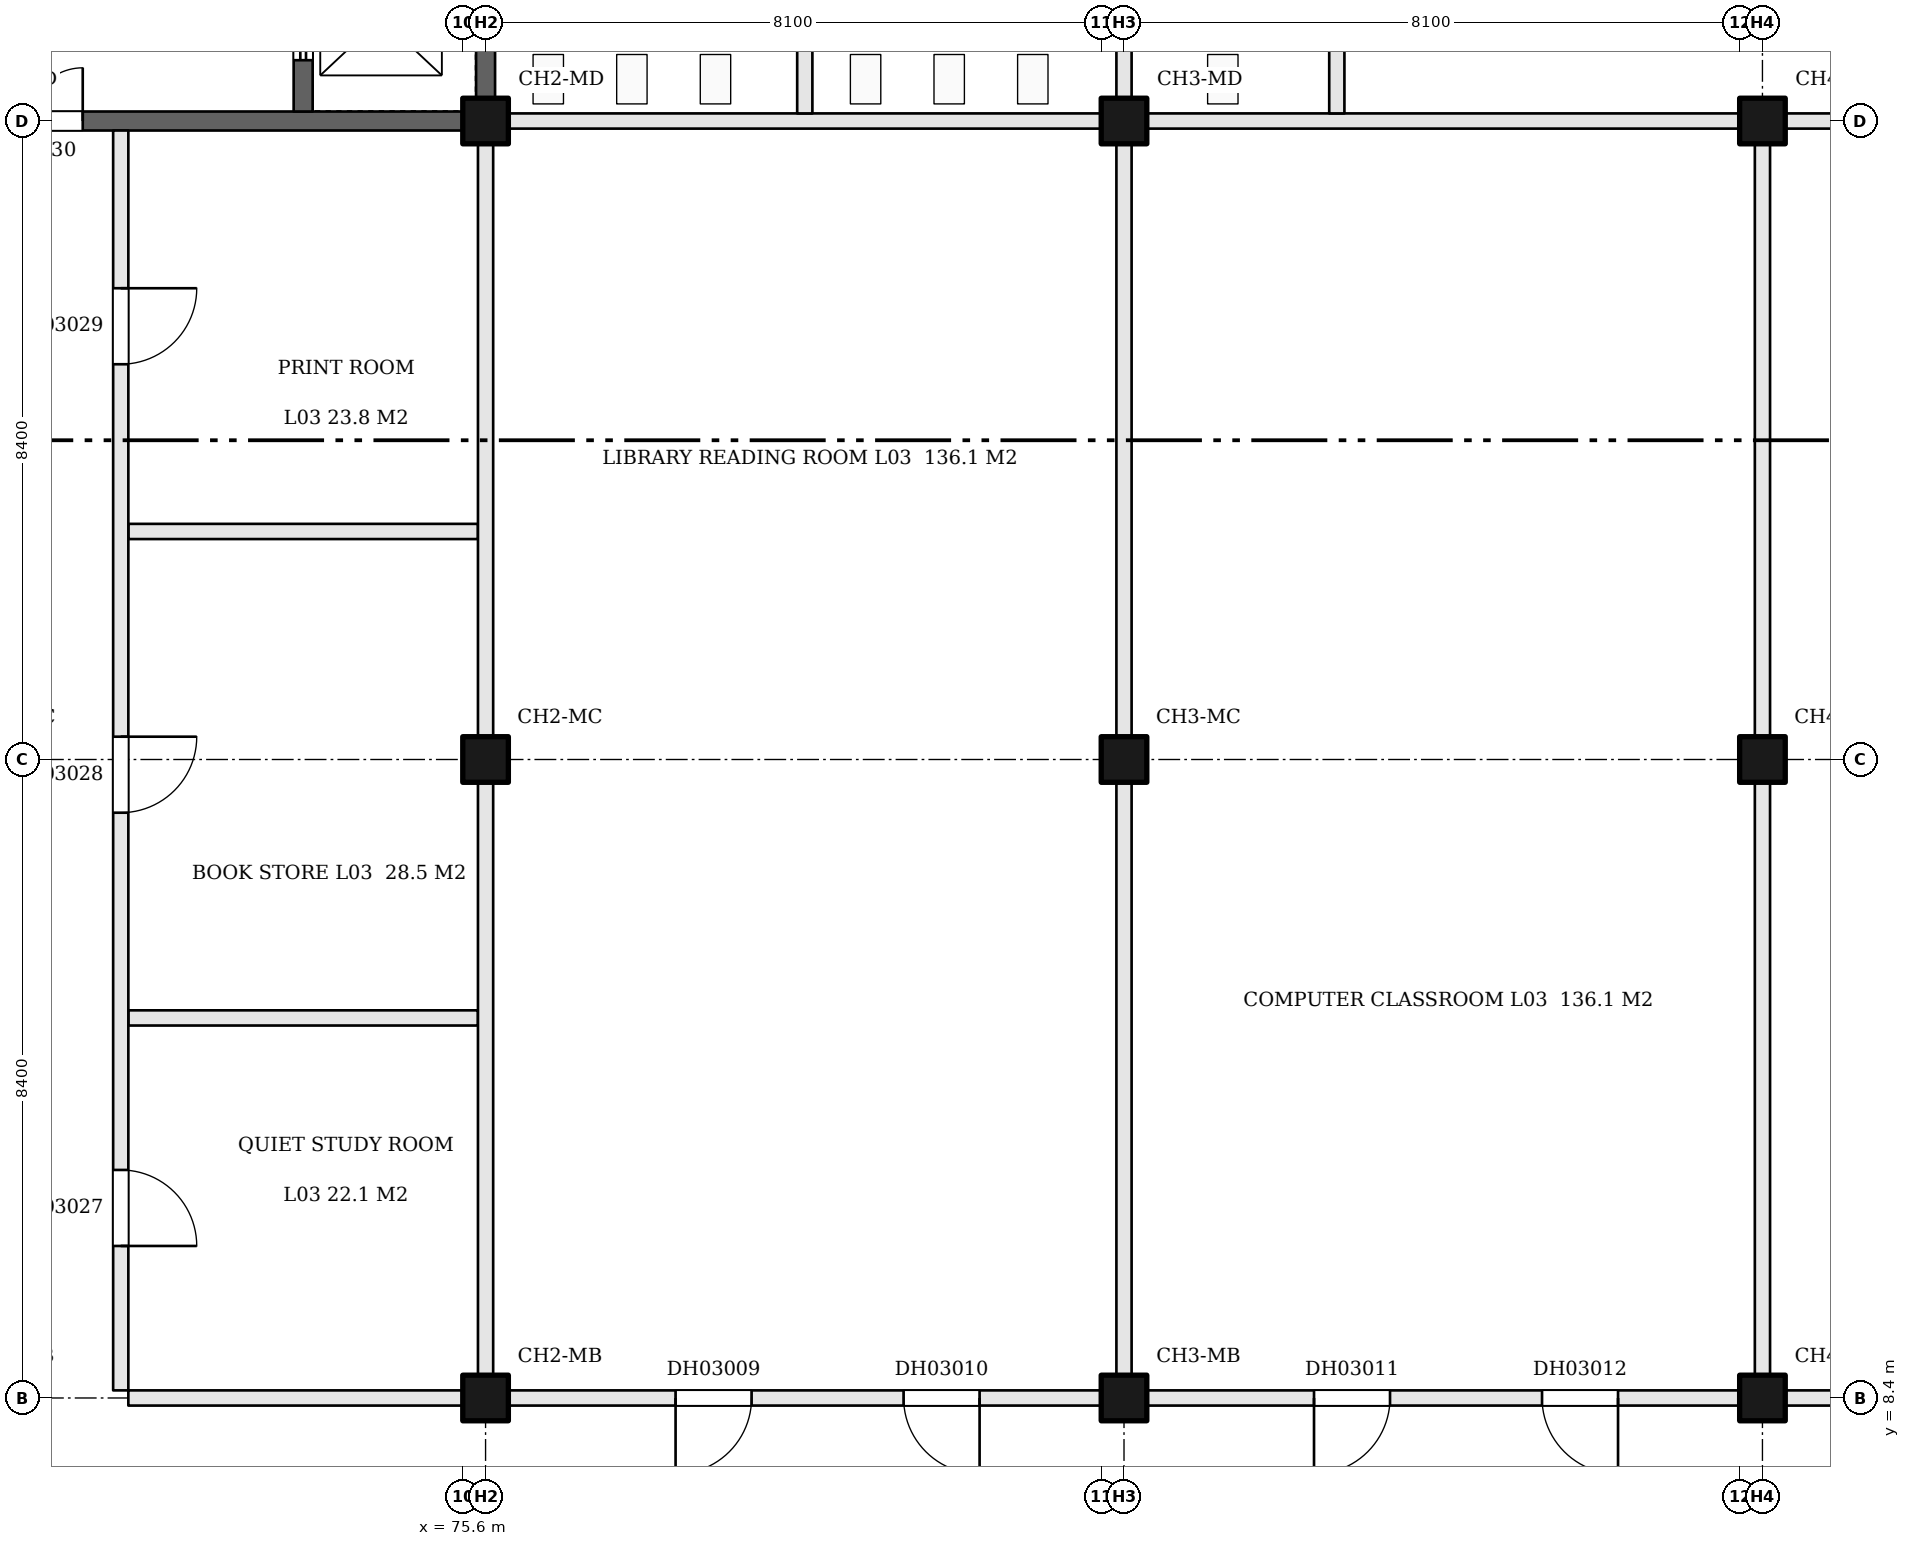
"""IFC4 building model, lengths in metres.
Left out: names, types, materials, properties, quantities, classifications, styles, units other than length and angle.
Written with IfcOpenShell. Run it as: python <this file> out.ifc"""

import sys

from ifc_helpers import new_model, si_unit, direction, frame, frame_2d, origin, origin_2d, place, context, subcontext, project, spatial, rectangle, extrude, element, fill, save


model = new_model("IFC4")
c1 = context("Model", 3, precision=1e-05, world=origin(), true_north=direction((0.0, 1.0)))
c2 = subcontext(c1, "Body", "Model", "MODEL_VIEW")
j1 = project(units=[si_unit("LENGTHUNIT", "METRE"), si_unit("PLANEANGLEUNIT", "RADIAN")], contexts=[c1])
p1 = place(None, origin())
s1 = spatial("IfcSite", under=j1, at=p1, CompositionType="ELEMENT")
p2 = place(p1, origin())
s2 = spatial("IfcBuilding", under=s1, at=p2, CompositionType="ELEMENT")
p3 = place(p2, frame((0.0, 0.0, 19.8)))
s3 = spatial("IfcBuildingStorey", under=s2, at=p3, CompositionType="ELEMENT", Elevation=19.8)
for number, where, z_axis, x_axis in (
    (1, (75.9, 8.4, 0.0), (0.0, 0.0, 1.0), (1.0, 0.0, 0.0)),
    (2, (75.9, 16.8, 0.0), (0.0, 0.0, 1.0), (1.0, 0.0, 0.0)),
    (3, (75.9, 25.2, 0.0), (0.0, 0.0, 1.0), (1.0, 0.0, 0.0)),
    (4, (84.3, 8.4, 0.0), (0.0, 0.0, 1.0), (1.0, 0.0, 0.0)),
    (5, (84.3, 16.8, 0.0), (0.0, 0.0, 1.0), (1.0, 0.0, 0.0)),
    (6, (84.3, 25.2, 0.0), (0.0, 0.0, 1.0), (1.0, 0.0, 0.0)),
    (7, (92.7, 8.4, 0.0), (0.0, 0.0, 1.0), (1.0, 0.0, 0.0)),
    (8, (92.7, 16.8, 0.0), (0.0, 0.0, 1.0), (1.0, 0.0, 0.0)),
    (9, (92.7, 25.2, 0.0), (0.0, 0.0, 1.0), (1.0, 0.0, 0.0)),
):
    element("IfcColumn", number, at=place(p3, frame(where, z_axis=z_axis, x_axis=x_axis)), inside=s3, PredefinedType="COLUMN", context=c2, shape_type="SweptSolid", body=[
        extrude(rectangle(XDim=0.6, YDim=0.6, at=origin_2d()), origin(), (0.0, 0.0, 1.0), 5.0),
    ])
p4 = place(p3, frame((71.2, 8.4, 0.0), z_axis=(0.0, 0.0, 1.0), x_axis=(1.0, 0.0, 0.0)))
e10 = element("IfcWall", 10, at=p4, inside=s3, PredefinedType="PARTITIONING", context=c2, shape_type="SweptSolid", body=[
    extrude(rectangle(XDim=4.4, YDim=0.2, at=frame_2d((2.2, 0.0))), origin(), (0.0, 0.0, 1.0), 5.0),
])
p5 = place(p3, frame((76.2, 8.4, 0.0), z_axis=(0.0, 0.0, 1.0), x_axis=(1.0, 0.0, 0.0)))
e11 = element("IfcWall", 11, at=p5, inside=s3, PredefinedType="PARTITIONING", context=c2, shape_type="SweptSolid", body=[
    extrude(rectangle(XDim=7.8, YDim=0.2, at=frame_2d((3.9, 0.0))), origin(), (0.0, 0.0, 1.0), 5.0),
])
p6 = place(p5, frame((2.2, 0.0, 0.0)))
e12 = element("IfcOpeningElement", 12, at=p6, cuts=e11, PredefinedType="OPENING", context=c2, shape_type="SweptSolid", body=[
    extrude(rectangle(XDim=1.0, YDim=2.1, at=frame_2d((0.5, 1.05))), frame((0.0, 0.11, 0.0), z_axis=(0.0, -1.0, 0.0), x_axis=(1.0, 0.0, 0.0)), (0.0, 0.0, 1.0), 0.22),
])
p7 = place(p5, frame((5.2, 0.0, 0.0)))
e13 = element("IfcOpeningElement", 13, at=p7, cuts=e11, PredefinedType="OPENING", context=c2, shape_type="SweptSolid", body=[
    extrude(rectangle(XDim=1.0, YDim=2.1, at=frame_2d((0.5, 1.05))), frame((0.0, 0.11, 0.0), z_axis=(0.0, -1.0, 0.0), x_axis=(1.0, 0.0, 0.0)), (0.0, 0.0, 1.0), 0.22),
])
p8 = place(p3, frame((84.6, 8.4, 0.0), z_axis=(0.0, 0.0, 1.0), x_axis=(1.0, 0.0, 0.0)))
e14 = element("IfcWall", 14, at=p8, inside=s3, PredefinedType="PARTITIONING", context=c2, shape_type="SweptSolid", body=[
    extrude(rectangle(XDim=7.8, YDim=0.2, at=frame_2d((3.9, 0.0))), origin(), (0.0, 0.0, 1.0), 5.0),
])
p9 = place(p8, frame((2.2, 0.0, 0.0)))
e15 = element("IfcOpeningElement", 15, at=p9, cuts=e14, PredefinedType="OPENING", context=c2, shape_type="SweptSolid", body=[
    extrude(rectangle(XDim=1.0, YDim=2.1, at=frame_2d((0.5, 1.05))), frame((0.0, 0.11, 0.0), z_axis=(0.0, -1.0, 0.0), x_axis=(1.0, 0.0, 0.0)), (0.0, 0.0, 1.0), 0.22),
])
p10 = place(p8, frame((5.2, 0.0, 0.0)))
e16 = element("IfcOpeningElement", 16, at=p10, cuts=e14, PredefinedType="OPENING", context=c2, shape_type="SweptSolid", body=[
    extrude(rectangle(XDim=1.0, YDim=2.1, at=frame_2d((0.5, 1.05))), frame((0.0, 0.11, 0.0), z_axis=(0.0, -1.0, 0.0), x_axis=(1.0, 0.0, 0.0)), (0.0, 0.0, 1.0), 0.22),
])
p11 = place(p3, frame((93.0, 8.4, 0.0), z_axis=(0.0, 0.0, 1.0), x_axis=(1.0, 0.0, 0.0)))
e17 = element("IfcWall", 17, at=p11, inside=s3, PredefinedType="PARTITIONING", context=c2, shape_type="SweptSolid", body=[
    extrude(rectangle(XDim=7.8, YDim=0.2, at=frame_2d((3.9, 0.0))), origin(), (0.0, 0.0, 1.0), 5.0),
])
p12 = place(p11, frame((2.2, 0.0, 0.0)))
e18 = element("IfcOpeningElement", 18, at=p12, cuts=e17, PredefinedType="OPENING", context=c2, shape_type="SweptSolid", body=[
    extrude(rectangle(XDim=1.0, YDim=2.1, at=frame_2d((0.5, 1.05))), frame((0.0, 0.11, 0.0), z_axis=(0.0, -1.0, 0.0), x_axis=(1.0, 0.0, 0.0)), (0.0, 0.0, 1.0), 0.22),
])
p13 = place(p11, frame((5.2, 0.0, 0.0)))
e19 = element("IfcOpeningElement", 19, at=p13, cuts=e17, PredefinedType="OPENING", context=c2, shape_type="SweptSolid", body=[
    extrude(rectangle(XDim=1.0, YDim=2.1, at=frame_2d((0.5, 1.05))), frame((0.0, 0.11, 0.0), z_axis=(0.0, -1.0, 0.0), x_axis=(1.0, 0.0, 0.0)), (0.0, 0.0, 1.0), 0.22),
])
for number, where, z_axis, x_axis in (
    (20, (71.2, 13.4, 0.0), (0.0, 0.0, 1.0), (1.0, 0.0, 0.0)),
    (21, (71.2, 19.8, 0.0), (0.0, 0.0, 1.0), (1.0, 0.0, 0.0)),
):
    element("IfcWall", number, at=place(p3, frame(where, z_axis=z_axis, x_axis=x_axis)), inside=s3, PredefinedType="PARTITIONING", context=c2, shape_type="SweptSolid", body=[
        extrude(rectangle(XDim=4.6, YDim=0.2, at=frame_2d((2.3, 0.0))), origin(), (0.0, 0.0, 1.0), 5.0),
    ])
p14 = place(p3, frame((69.0, 25.2, 0.0), z_axis=(0.0, 0.0, 1.0), x_axis=(1.0, 0.0, 0.0)))
e22 = element("IfcWall", 22, at=p14, inside=s3, PredefinedType="SHEAR", context=c2, shape_type="SweptSolid", body=[
    extrude(rectangle(XDim=6.6, YDim=0.25, at=frame_2d((3.3, 0.0))), origin(), (0.0, 0.0, 1.0), 5.0),
])
p15 = place(p14, frame((0.2, 0.0, 0.0)))
e23 = element("IfcOpeningElement", 23, at=p15, cuts=e22, PredefinedType="OPENING", context=c2, shape_type="SweptSolid", body=[
    extrude(rectangle(XDim=1.4, YDim=2.1, at=frame_2d((0.7, 1.05))), frame((0.0, 0.135, 0.0), z_axis=(0.0, -1.0, 0.0), x_axis=(1.0, 0.0, 0.0)), (0.0, 0.0, 1.0), 0.27),
])
p16 = place(p3, frame((76.2, 25.2, 0.0), z_axis=(0.0, 0.0, 1.0), x_axis=(1.0, 0.0, 0.0)))
e24 = element("IfcWall", 24, at=p16, inside=s3, PredefinedType="PARTITIONING", context=c2, shape_type="SweptSolid", body=[
    extrude(rectangle(XDim=7.8, YDim=0.2, at=frame_2d((3.9, 0.0))), origin(), (0.0, 0.0, 1.0), 5.0),
])
p17 = place(p3, frame((84.6, 25.2, 0.0), z_axis=(0.0, 0.0, 1.0), x_axis=(1.0, 0.0, 0.0)))
e25 = element("IfcWall", 25, at=p17, inside=s3, PredefinedType="PARTITIONING", context=c2, shape_type="SweptSolid", body=[
    extrude(rectangle(XDim=7.8, YDim=0.2, at=frame_2d((3.9, 0.0))), origin(), (0.0, 0.0, 1.0), 5.0),
])
p18 = place(p3, frame((93.0, 25.2, 0.0), z_axis=(0.0, 0.0, 1.0), x_axis=(1.0, 0.0, 0.0)))
e26 = element("IfcWall", 26, at=p18, inside=s3, PredefinedType="PARTITIONING", context=c2, shape_type="SweptSolid", body=[
    extrude(rectangle(XDim=7.8, YDim=0.2, at=frame_2d((3.9, 0.0))), origin(), (0.0, 0.0, 1.0), 5.0),
])
p19 = place(p3, frame((71.1, 8.5, 0.0), z_axis=(0.0, 0.0, 1.0), x_axis=(0.0, 1.0, 0.0)))
e27 = element("IfcWall", 27, at=p19, inside=s3, PredefinedType="PARTITIONING", context=c2, shape_type="SweptSolid", body=[
    extrude(rectangle(XDim=16.575, YDim=0.2, at=frame_2d((8.288, 0.0))), origin(), (0.0, 0.0, 1.0), 5.0),
])
p20 = place(p19, frame((1.9, 0.0, 0.0)))
e28 = element("IfcOpeningElement", 28, at=p20, cuts=e27, PredefinedType="OPENING", context=c2, shape_type="SweptSolid", body=[
    extrude(rectangle(XDim=1.0, YDim=2.1, at=frame_2d((0.5, 1.05))), frame((0.0, 0.11, 0.0), z_axis=(0.0, -1.0, 0.0), x_axis=(1.0, 0.0, 0.0)), (0.0, 0.0, 1.0), 0.22),
])
p21 = place(p19, frame((7.6, 0.0, 0.0)))
e29 = element("IfcOpeningElement", 29, at=p21, cuts=e27, PredefinedType="OPENING", context=c2, shape_type="SweptSolid", body=[
    extrude(rectangle(XDim=1.0, YDim=2.1, at=frame_2d((0.5, 1.05))), frame((0.0, 0.11, 0.0), z_axis=(0.0, -1.0, 0.0), x_axis=(1.0, 0.0, 0.0)), (0.0, 0.0, 1.0), 0.22),
])
p22 = place(p19, frame((13.5, 0.0, 0.0)))
e30 = element("IfcOpeningElement", 30, at=p22, cuts=e27, PredefinedType="OPENING", context=c2, shape_type="SweptSolid", body=[
    extrude(rectangle(XDim=1.0, YDim=2.1, at=frame_2d((0.5, 1.05))), frame((0.0, 0.11, 0.0), z_axis=(0.0, -1.0, 0.0), x_axis=(1.0, 0.0, 0.0)), (0.0, 0.0, 1.0), 0.22),
])
p23 = place(p3, frame((73.5, 25.325, 0.0), z_axis=(0.0, 0.0, 1.0), x_axis=(0.0, 1.0, 0.0)))
e31 = element("IfcWall", 31, at=p23, inside=s3, PredefinedType="SHEAR", context=c2, shape_type="SweptSolid", body=[
    extrude(rectangle(XDim=5.15, YDim=0.25, at=frame_2d((2.575, 0.0))), origin(), (0.0, 0.0, 1.0), 5.0),
])
p24 = place(p23, frame((0.675, 0.0, 0.0)))
e32 = element("IfcOpeningElement", 32, at=p24, cuts=e31, PredefinedType="OPENING", context=c2, shape_type="SweptSolid", body=[
    extrude(rectangle(XDim=1.1, YDim=2.1, at=frame_2d((0.55, 1.05))), frame((0.0, 0.135, 0.0), z_axis=(0.0, -1.0, 0.0), x_axis=(1.0, 0.0, 0.0)), (0.0, 0.0, 1.0), 0.27),
])
p25 = place(p23, frame((3.475, 0.0, 0.0)))
e33 = element("IfcOpeningElement", 33, at=p25, cuts=e31, PredefinedType="OPENING", context=c2, shape_type="SweptSolid", body=[
    extrude(rectangle(XDim=0.9, YDim=2.1, at=frame_2d((0.45, 1.05))), frame((0.0, 0.135, 0.0), z_axis=(0.0, -1.0, 0.0), x_axis=(1.0, 0.0, 0.0)), (0.0, 0.0, 1.0), 0.27),
])
p26 = place(p3, frame((75.9, 8.7, 0.0), z_axis=(0.0, 0.0, 1.0), x_axis=(0.0, 1.0, 0.0)))
e34 = element("IfcWall", 34, at=p26, inside=s3, PredefinedType="PARTITIONING", context=c2, shape_type="SweptSolid", body=[
    extrude(rectangle(XDim=7.8, YDim=0.2, at=frame_2d((3.9, 0.0))), origin(), (0.0, 0.0, 1.0), 5.0),
])
p27 = place(p3, frame((75.9, 17.1, 0.0), z_axis=(0.0, 0.0, 1.0), x_axis=(0.0, 1.0, 0.0)))
e35 = element("IfcWall", 35, at=p27, inside=s3, PredefinedType="PARTITIONING", context=c2, shape_type="SweptSolid", body=[
    extrude(rectangle(XDim=7.8, YDim=0.2, at=frame_2d((3.9, 0.0))), origin(), (0.0, 0.0, 1.0), 5.0),
])
p28 = place(p3, frame((75.9, 25.5, 0.0), z_axis=(0.0, 0.0, 1.0), x_axis=(0.0, 1.0, 0.0)))
e36 = element("IfcWall", 36, at=p28, inside=s3, PredefinedType="SHEAR", context=c2, shape_type="SweptSolid", body=[
    extrude(rectangle(XDim=7.2, YDim=0.25, at=frame_2d((3.6, 0.0))), origin(), (0.0, 0.0, 1.0), 5.0),
])
p29 = place(p3, frame((80.1, 25.3, 0.0), z_axis=(0.0, 0.0, 1.0), x_axis=(0.0, 1.0, 0.0)))
e37 = element("IfcWall", 37, at=p29, inside=s3, PredefinedType="PARTITIONING", context=c2, shape_type="SweptSolid", body=[
    extrude(rectangle(XDim=4.4, YDim=0.2, at=frame_2d((2.2, 0.0))), origin(), (0.0, 0.0, 1.0), 5.0),
])
p30 = place(p3, frame((84.3, 8.7, 0.0), z_axis=(0.0, 0.0, 1.0), x_axis=(0.0, 1.0, 0.0)))
e38 = element("IfcWall", 38, at=p30, inside=s3, PredefinedType="PARTITIONING", context=c2, shape_type="SweptSolid", body=[
    extrude(rectangle(XDim=7.8, YDim=0.2, at=frame_2d((3.9, 0.0))), origin(), (0.0, 0.0, 1.0), 5.0),
])
p31 = place(p3, frame((84.3, 17.1, 0.0), z_axis=(0.0, 0.0, 1.0), x_axis=(0.0, 1.0, 0.0)))
e39 = element("IfcWall", 39, at=p31, inside=s3, PredefinedType="PARTITIONING", context=c2, shape_type="SweptSolid", body=[
    extrude(rectangle(XDim=7.8, YDim=0.2, at=frame_2d((3.9, 0.0))), origin(), (0.0, 0.0, 1.0), 5.0),
])
p32 = place(p3, frame((84.3, 25.5, 0.0), z_axis=(0.0, 0.0, 1.0), x_axis=(0.0, 1.0, 0.0)))
e40 = element("IfcWall", 40, at=p32, inside=s3, PredefinedType="PARTITIONING", context=c2, shape_type="SweptSolid", body=[
    extrude(rectangle(XDim=4.2, YDim=0.2, at=frame_2d((2.1, 0.0))), origin(), (0.0, 0.0, 1.0), 5.0),
])
p33 = place(p3, frame((87.1, 25.3, 0.0), z_axis=(0.0, 0.0, 1.0), x_axis=(0.0, 1.0, 0.0)))
e41 = element("IfcWall", 41, at=p33, inside=s3, PredefinedType="PARTITIONING", context=c2, shape_type="SweptSolid", body=[
    extrude(rectangle(XDim=4.4, YDim=0.2, at=frame_2d((2.2, 0.0))), origin(), (0.0, 0.0, 1.0), 5.0),
])
p34 = place(p3, frame((92.7, 8.7, 0.0), z_axis=(0.0, 0.0, 1.0), x_axis=(0.0, 1.0, 0.0)))
e42 = element("IfcWall", 42, at=p34, inside=s3, PredefinedType="PARTITIONING", context=c2, shape_type="SweptSolid", body=[
    extrude(rectangle(XDim=7.8, YDim=0.2, at=frame_2d((3.9, 0.0))), origin(), (0.0, 0.0, 1.0), 5.0),
])
p35 = place(p3, frame((92.7, 17.1, 0.0), z_axis=(0.0, 0.0, 1.0), x_axis=(0.0, 1.0, 0.0)))
e43 = element("IfcWall", 43, at=p35, inside=s3, PredefinedType="PARTITIONING", context=c2, shape_type="SweptSolid", body=[
    extrude(rectangle(XDim=7.8, YDim=0.2, at=frame_2d((3.9, 0.0))), origin(), (0.0, 0.0, 1.0), 5.0),
])
p36 = place(p6, frame((1.0, 0.0, 0.0), z_axis=(0.0, 0.0, 1.0), x_axis=(-1.0, 0.0, 0.0)))
e44 = element("IfcDoor", 44, at=p36, inside=s3, OperationType="SINGLE_SWING_RIGHT", PredefinedType="DOOR", context=c2, shape_type="SweptSolid", body=[
    extrude(rectangle(XDim=1.0, YDim=2.1, at=frame_2d((0.5, 1.05))), frame((0.0, 0.025, 0.0), z_axis=(0.0, -1.0, 0.0), x_axis=(1.0, 0.0, 0.0)), (0.0, 0.0, 1.0), 0.05),
])
fill(e12, e44)
p37 = place(p7, frame((1.0, 0.0, 0.0), z_axis=(0.0, 0.0, 1.0), x_axis=(-1.0, 0.0, 0.0)))
e45 = element("IfcDoor", 45, at=p37, inside=s3, OperationType="SINGLE_SWING_LEFT", PredefinedType="DOOR", context=c2, shape_type="SweptSolid", body=[
    extrude(rectangle(XDim=1.0, YDim=2.1, at=frame_2d((0.5, 1.05))), frame((0.0, 0.025, 0.0), z_axis=(0.0, -1.0, 0.0), x_axis=(1.0, 0.0, 0.0)), (0.0, 0.0, 1.0), 0.05),
])
fill(e13, e45)
p38 = place(p9, frame((1.0, 0.0, 0.0), z_axis=(0.0, 0.0, 1.0), x_axis=(-1.0, 0.0, 0.0)))
e46 = element("IfcDoor", 46, at=p38, inside=s3, OperationType="SINGLE_SWING_RIGHT", PredefinedType="DOOR", context=c2, shape_type="SweptSolid", body=[
    extrude(rectangle(XDim=1.0, YDim=2.1, at=frame_2d((0.5, 1.05))), frame((0.0, 0.025, 0.0), z_axis=(0.0, -1.0, 0.0), x_axis=(1.0, 0.0, 0.0)), (0.0, 0.0, 1.0), 0.05),
])
fill(e15, e46)
p39 = place(p10, frame((1.0, 0.0, 0.0), z_axis=(0.0, 0.0, 1.0), x_axis=(-1.0, 0.0, 0.0)))
e47 = element("IfcDoor", 47, at=p39, inside=s3, OperationType="SINGLE_SWING_LEFT", PredefinedType="DOOR", context=c2, shape_type="SweptSolid", body=[
    extrude(rectangle(XDim=1.0, YDim=2.1, at=frame_2d((0.5, 1.05))), frame((0.0, 0.025, 0.0), z_axis=(0.0, -1.0, 0.0), x_axis=(1.0, 0.0, 0.0)), (0.0, 0.0, 1.0), 0.05),
])
fill(e16, e47)
p40 = place(p20, frame((1.0, 0.0, 0.0), z_axis=(0.0, 0.0, 1.0), x_axis=(-1.0, 0.0, 0.0)))
e48 = element("IfcDoor", 48, at=p40, inside=s3, OperationType="SINGLE_SWING_RIGHT", PredefinedType="DOOR", context=c2, shape_type="SweptSolid", body=[
    extrude(rectangle(XDim=1.0, YDim=2.1, at=frame_2d((0.5, 1.05))), frame((0.0, 0.025, 0.0), z_axis=(0.0, -1.0, 0.0), x_axis=(1.0, 0.0, 0.0)), (0.0, 0.0, 1.0), 0.05),
])
fill(e28, e48)
p41 = place(p21, frame((1.0, 0.0, 0.0), z_axis=(0.0, 0.0, 1.0), x_axis=(-1.0, 0.0, 0.0)))
e49 = element("IfcDoor", 49, at=p41, inside=s3, OperationType="SINGLE_SWING_LEFT", PredefinedType="DOOR", context=c2, shape_type="SweptSolid", body=[
    extrude(rectangle(XDim=1.0, YDim=2.1, at=frame_2d((0.5, 1.05))), frame((0.0, 0.025, 0.0), z_axis=(0.0, -1.0, 0.0), x_axis=(1.0, 0.0, 0.0)), (0.0, 0.0, 1.0), 0.05),
])
fill(e29, e49)
p42 = place(p22, frame((1.0, 0.0, 0.0), z_axis=(0.0, 0.0, 1.0), x_axis=(-1.0, 0.0, 0.0)))
e50 = element("IfcDoor", 50, at=p42, inside=s3, OperationType="SINGLE_SWING_LEFT", PredefinedType="DOOR", context=c2, shape_type="SweptSolid", body=[
    extrude(rectangle(XDim=1.0, YDim=2.1, at=frame_2d((0.5, 1.05))), frame((0.0, 0.025, 0.0), z_axis=(0.0, -1.0, 0.0), x_axis=(1.0, 0.0, 0.0)), (0.0, 0.0, 1.0), 0.05),
])
fill(e30, e50)
p43 = place(p15, origin())
e51 = element("IfcDoor", 51, at=p43, inside=s3, OperationType="DOUBLE_DOOR_SINGLE_SWING", PredefinedType="DOOR", context=c2, shape_type="SweptSolid", body=[
    extrude(rectangle(XDim=1.4, YDim=2.1, at=frame_2d((0.7, 1.05))), frame((0.0, 0.025, 0.0), z_axis=(0.0, -1.0, 0.0), x_axis=(1.0, 0.0, 0.0)), (0.0, 0.0, 1.0), 0.05),
])
fill(e23, e51)
p44 = place(p24, origin())
e52 = element("IfcDoor", 52, at=p44, inside=s3, OperationType="SLIDING_TO_LEFT", PredefinedType="DOOR", context=c2, shape_type="SweptSolid", body=[
    extrude(rectangle(XDim=1.1, YDim=2.1, at=frame_2d((0.55, 1.05))), frame((0.0, 0.025, 0.0), z_axis=(0.0, -1.0, 0.0), x_axis=(1.0, 0.0, 0.0)), (0.0, 0.0, 1.0), 0.05),
])
fill(e32, e52)
save(model, sys.argv[1])
